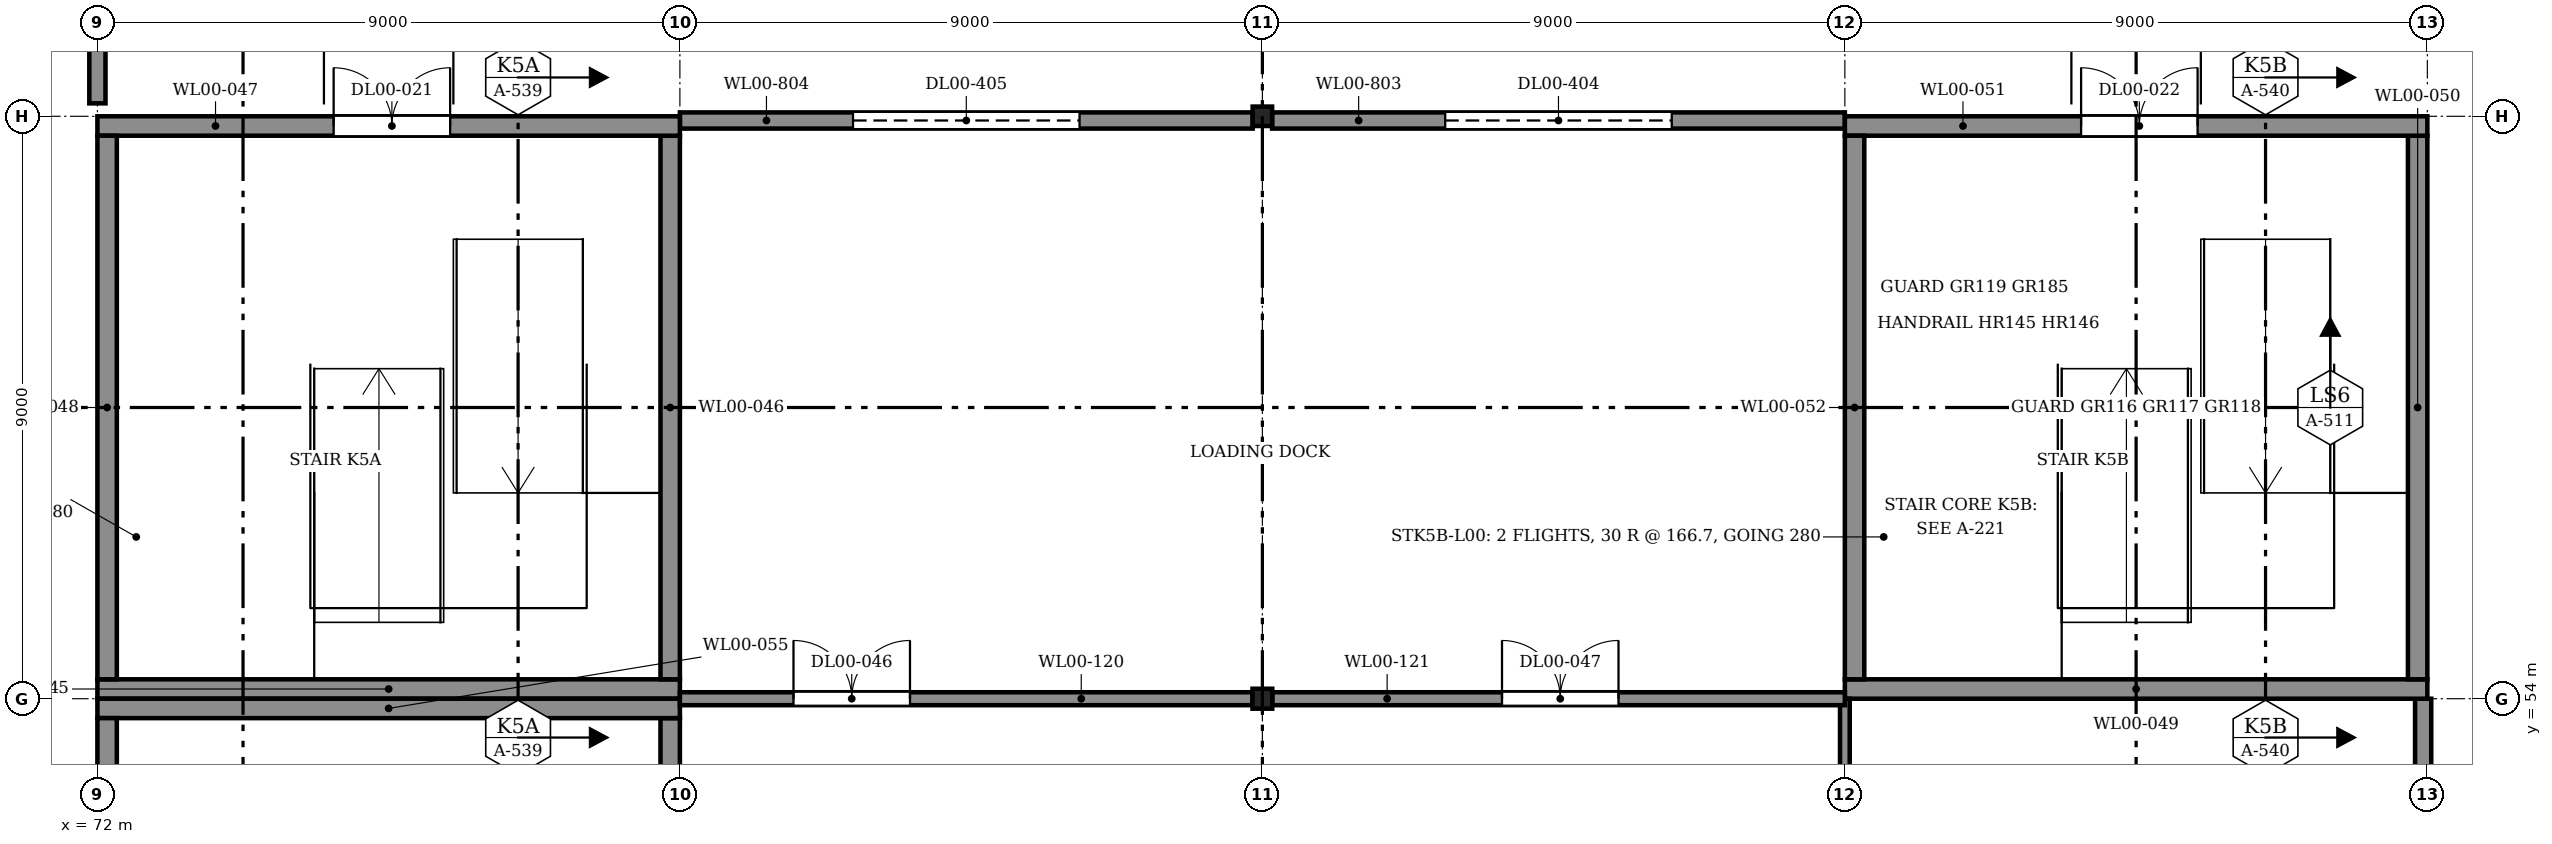
"""IFC4 building model, lengths in metres.
Left out: names, types, materials, properties, quantities, classifications, styles, units other than length and angle.
Written with IfcOpenShell. Run it as: python <this file> out.ifc"""

import sys

from ifc_helpers import new_model, si_unit, direction, frame, frame_2d, origin, origin_2d, place, context, subcontext, project, spatial, polyline, rectangle, hollow_rectangle, i_section, outline, extrude, element, fill, save


model = new_model("IFC4")
c1 = context("Model", 3, precision=1e-05, world=origin(), true_north=direction((0.0, 1.0)))
c2 = subcontext(c1, "Body", "Model", "MODEL_VIEW")
j1 = project(units=[si_unit("LENGTHUNIT", "METRE"), si_unit("PLANEANGLEUNIT", "RADIAN")], contexts=[c1])
p1 = place(None, origin())
s1 = spatial("IfcSite", under=j1, at=p1, CompositionType="ELEMENT")
p2 = place(p1, origin())
s2 = spatial("IfcBuilding", under=s1, at=p2, CompositionType="ELEMENT")
p3 = place(p2, origin())
s3 = spatial("IfcBuildingStorey", under=s2, at=p3, CompositionType="ELEMENT", Elevation=0.0)
p4 = place(p3, frame((90.0, 54.0, 0.0), z_axis=(0.0, 0.0, 1.0), x_axis=(1.0, 0.0, 0.0)))
e1 = element("IfcColumn", 1, at=p4, inside=s3, PredefinedType="COLUMN", context=c2, shape_type="SweptSolid", body=[
    extrude(i_section(OverallWidth=0.305, OverallDepth=0.308, WebThickness=0.01, FlangeThickness=0.015, FilletRadius=0.017, at=origin_2d()), origin(), (0.0, 0.0, 1.0), 5.0),
])
p5 = place(p3, frame((90.0, 63.0, 0.0), z_axis=(0.0, 0.0, 1.0), x_axis=(1.0, 0.0, 0.0)))
e2 = element("IfcColumn", 2, at=p5, inside=s3, PredefinedType="COLUMN", context=c2, shape_type="SweptSolid", body=[
    extrude(hollow_rectangle(XDim=0.3, YDim=0.3, WallThickness=0.01, InnerFilletRadius=0.015, OuterFilletRadius=0.025, at=origin_2d()), origin(), (0.0, 0.0, 1.0), 5.0),
])
p6 = place(p3, frame((107.935, 45.15, 0.0), z_axis=(0.0, 0.0, 1.0), x_axis=(0.0, 1.0, 0.0)))
e3 = element("IfcWall", 3, at=p6, inside=s3, PredefinedType="SOLIDWALL", context=c2, shape_type="SweptSolid", body=[
    extrude(rectangle(XDim=8.85, YDim=0.25, at=frame_2d((4.425, 0.0))), origin(), (0.0, 0.0, 1.0), 4.05),
])
p7 = place(p3, frame((90.15, 62.935, 0.0), z_axis=(0.0, 0.0, 1.0), x_axis=(1.0, 0.0, 0.0)))
e4 = element("IfcWall", 4, at=p7, inside=s3, PredefinedType="SOLIDWALL", context=c2, shape_type="SweptSolid", body=[
    extrude(rectangle(XDim=8.85, YDim=0.25, at=frame_2d((4.425, 0.0))), origin(), (0.0, 0.0, 1.0), 4.05),
])
p8 = place(p7, frame((2.675, 0.0, 0.0)))
e5 = element("IfcOpeningElement", 5, at=p8, cuts=e4, PredefinedType="OPENING", context=c2, shape_type="SweptSolid", body=[
    extrude(rectangle(XDim=3.5, YDim=4.0, at=frame_2d((1.75, 2.0))), frame((0.0, 0.135, 0.0), z_axis=(0.0, -1.0, 0.0), x_axis=(1.0, 0.0, 0.0)), (0.0, 0.0, 1.0), 0.27),
])
p9 = place(p3, frame((81.0, 62.935, 0.0), z_axis=(0.0, 0.0, 1.0), x_axis=(1.0, 0.0, 0.0)))
e6 = element("IfcWall", 6, at=p9, inside=s3, PredefinedType="SOLIDWALL", context=c2, shape_type="SweptSolid", body=[
    extrude(rectangle(XDim=8.85, YDim=0.25, at=frame_2d((4.425, 0.0))), origin(), (0.0, 0.0, 1.0), 4.05),
])
p10 = place(p9, frame((2.675, 0.0, 0.0)))
e7 = element("IfcOpeningElement", 7, at=p10, cuts=e6, PredefinedType="OPENING", context=c2, shape_type="SweptSolid", body=[
    extrude(rectangle(XDim=3.5, YDim=4.0, at=frame_2d((1.75, 2.0))), frame((0.0, 0.135, 0.0), z_axis=(0.0, -1.0, 0.0), x_axis=(1.0, 0.0, 0.0)), (0.0, 0.0, 1.0), 0.27),
])
p11 = place(p3, frame((72.0, 63.2, -1.95), z_axis=(0.0, 0.0, 1.0), x_axis=(0.0, 1.0, 0.0)))
e8 = element("IfcWall", 8, at=p11, inside=s3, PredefinedType="SOLIDWALL", context=c2, shape_type="SweptSolid", body=[
    extrude(outline(polyline([(0.0, 0.0), (5.8, 0.0), (5.8, 0.75), (0.0, 1.04), (0.0, 0.0)])), frame((0.0, 0.125, 0.0), z_axis=(0.0, -1.0, 0.0), x_axis=(1.0, 0.0, 0.0)), (0.0, 0.0, 1.0), 0.25),
])
p12 = place(p3, frame((72.0, 54.15, 0.0), z_axis=(0.0, 0.0, 1.0), x_axis=(1.0, 0.0, 0.0)))
e9 = element("IfcWall", 9, at=p12, inside=s3, PredefinedType="SOLIDWALL", context=c2, shape_type="SweptSolid", body=[
    extrude(rectangle(XDim=9.0, YDim=0.3, at=frame_2d((4.5, 0.0))), origin(), (0.0, 0.0, 1.0), 5.0),
])
p13 = place(p3, frame((80.85, 54.3, 0.0), z_axis=(0.0, 0.0, 1.0), x_axis=(0.0, 1.0, 0.0)))
e10 = element("IfcWall", 10, at=p13, inside=s3, PredefinedType="SOLIDWALL", context=c2, shape_type="SweptSolid", body=[
    extrude(rectangle(XDim=8.4, YDim=0.3, at=frame_2d((4.2, 0.0))), origin(), (0.0, 0.0, 1.0), 5.0),
])
p14 = place(p3, frame((72.0, 62.85, 0.0), z_axis=(0.0, 0.0, 1.0), x_axis=(1.0, 0.0, 0.0)))
e11 = element("IfcWall", 11, at=p14, inside=s3, PredefinedType="SOLIDWALL", context=c2, shape_type="SweptSolid", body=[
    extrude(rectangle(XDim=9.0, YDim=0.3, at=frame_2d((4.5, 0.0))), origin(), (0.0, 0.0, 1.0), 5.0),
])
p15 = place(p14, frame((3.65, 0.0, 0.0)))
e12 = element("IfcOpeningElement", 12, at=p15, cuts=e11, PredefinedType="OPENING", context=c2, shape_type="SweptSolid", body=[
    extrude(rectangle(XDim=1.8, YDim=2.1, at=frame_2d((0.9, 1.05))), frame((0.0, 0.16, 0.0), z_axis=(0.0, -1.0, 0.0), x_axis=(1.0, 0.0, 0.0)), (0.0, 0.0, 1.0), 0.32),
])
p16 = place(p3, frame((72.15, 54.3, 0.0), z_axis=(0.0, 0.0, 1.0), x_axis=(0.0, 1.0, 0.0)))
e13 = element("IfcWall", 13, at=p16, inside=s3, PredefinedType="SOLIDWALL", context=c2, shape_type="SweptSolid", body=[
    extrude(rectangle(XDim=8.4, YDim=0.3, at=frame_2d((4.2, 0.0))), origin(), (0.0, 0.0, 1.0), 5.0),
])
p17 = place(p3, frame((99.0, 54.15, 0.0), z_axis=(0.0, 0.0, 1.0), x_axis=(1.0, 0.0, 0.0)))
e14 = element("IfcWall", 14, at=p17, inside=s3, PredefinedType="SOLIDWALL", context=c2, shape_type="SweptSolid", body=[
    extrude(rectangle(XDim=9.0, YDim=0.3, at=frame_2d((4.5, 0.0))), origin(), (0.0, 0.0, 1.0), 5.0),
])
p18 = place(p3, frame((107.85, 54.3, 0.0), z_axis=(0.0, 0.0, 1.0), x_axis=(0.0, 1.0, 0.0)))
e15 = element("IfcWall", 15, at=p18, inside=s3, PredefinedType="SOLIDWALL", context=c2, shape_type="SweptSolid", body=[
    extrude(rectangle(XDim=8.4, YDim=0.3, at=frame_2d((4.2, 0.0))), origin(), (0.0, 0.0, 1.0), 5.0),
])
p19 = place(p3, frame((99.0, 62.85, 0.0), z_axis=(0.0, 0.0, 1.0), x_axis=(1.0, 0.0, 0.0)))
e16 = element("IfcWall", 16, at=p19, inside=s3, PredefinedType="SOLIDWALL", context=c2, shape_type="SweptSolid", body=[
    extrude(rectangle(XDim=9.0, YDim=0.3, at=frame_2d((4.5, 0.0))), origin(), (0.0, 0.0, 1.0), 5.0),
])
p20 = place(p19, frame((3.65, 0.0, 0.0)))
e17 = element("IfcOpeningElement", 17, at=p20, cuts=e16, PredefinedType="OPENING", context=c2, shape_type="SweptSolid", body=[
    extrude(rectangle(XDim=1.8, YDim=2.1, at=frame_2d((0.9, 1.05))), frame((0.0, 0.16, 0.0), z_axis=(0.0, -1.0, 0.0), x_axis=(1.0, 0.0, 0.0)), (0.0, 0.0, 1.0), 0.32),
])
p21 = place(p3, frame((99.15, 54.3, 0.0), z_axis=(0.0, 0.0, 1.0), x_axis=(0.0, 1.0, 0.0)))
e18 = element("IfcWall", 18, at=p21, inside=s3, PredefinedType="SOLIDWALL", context=c2, shape_type="SweptSolid", body=[
    extrude(rectangle(XDim=8.4, YDim=0.3, at=frame_2d((4.2, 0.0))), origin(), (0.0, 0.0, 1.0), 5.0),
])
p22 = place(p3, frame((80.85, 45.3, 0.0), z_axis=(0.0, 0.0, 1.0), x_axis=(0.0, 1.0, 0.0)))
e19 = element("IfcWall", 19, at=p22, inside=s3, PredefinedType="SOLIDWALL", context=c2, shape_type="SweptSolid", body=[
    extrude(rectangle(XDim=8.4, YDim=0.3, at=frame_2d((4.2, 0.0))), origin(), (0.0, 0.0, 1.0), 5.0),
])
p23 = place(p22, frame((3.0, 0.0, 0.0)))
e20 = element("IfcOpeningElement", 20, at=p23, cuts=e19, PredefinedType="OPENING", context=c2, shape_type="SweptSolid", body=[
    extrude(rectangle(XDim=2.4, YDim=2.4, at=frame_2d((1.2, 1.2))), frame((0.0, 0.16, 0.0), z_axis=(0.0, -1.0, 0.0), x_axis=(1.0, 0.0, 0.0)), (0.0, 0.0, 1.0), 0.32),
])
p24 = place(p3, frame((72.0, 53.85, 0.0), z_axis=(0.0, 0.0, 1.0), x_axis=(1.0, 0.0, 0.0)))
e21 = element("IfcWall", 21, at=p24, inside=s3, PredefinedType="SOLIDWALL", context=c2, shape_type="SweptSolid", body=[
    extrude(rectangle(XDim=9.0, YDim=0.3, at=frame_2d((4.5, 0.0))), origin(), (0.0, 0.0, 1.0), 5.0),
])
p25 = place(p3, frame((72.15, 45.3, 0.0), z_axis=(0.0, 0.0, 1.0), x_axis=(0.0, 1.0, 0.0)))
e22 = element("IfcWall", 22, at=p25, inside=s3, PredefinedType="SOLIDWALL", context=c2, shape_type="SweptSolid", body=[
    extrude(rectangle(XDim=8.4, YDim=0.3, at=frame_2d((4.2, 0.0))), origin(), (0.0, 0.0, 1.0), 5.0),
])
p26 = place(p3, frame((99.0, 45.16, 0.0), z_axis=(0.0, 0.0, 1.0), x_axis=(0.0, 1.0, 0.0)))
e23 = element("IfcWall", 23, at=p26, inside=s3, PredefinedType="PARTITIONING", context=c2, shape_type="SweptSolid", body=[
    extrude(rectangle(XDim=8.84, YDim=0.15, at=frame_2d((4.42, 0.0))), origin(), (0.0, 0.0, 1.0), 3.958),
])
p27 = place(p26, frame((3.95, 0.0, 0.0)))
e24 = element("IfcOpeningElement", 24, at=p27, cuts=e23, PredefinedType="OPENING", context=c2, shape_type="SweptSolid", body=[
    extrude(rectangle(XDim=1.0, YDim=2.1, at=frame_2d((0.5, 1.05))), frame((0.0, 0.085, 0.0), z_axis=(0.0, -1.0, 0.0), x_axis=(1.0, 0.0, 0.0)), (0.0, 0.0, 1.0), 0.17),
])
p28 = place(p3, frame((81.0, 54.0, 0.0), z_axis=(0.0, 0.0, 1.0), x_axis=(1.0, 0.0, 0.0)))
e25 = element("IfcWall", 25, at=p28, inside=s3, PredefinedType="PARTITIONING", context=c2, shape_type="SweptSolid", body=[
    extrude(rectangle(XDim=8.847, YDim=0.2, at=frame_2d((4.424, 0.0))), origin(), (0.0, 0.0, 1.0), 3.958),
])
p29 = place(p28, frame((1.755, 0.0, 0.0)))
e26 = element("IfcOpeningElement", 26, at=p29, cuts=e25, PredefinedType="OPENING", context=c2, shape_type="SweptSolid", body=[
    extrude(rectangle(XDim=1.8, YDim=2.1, at=frame_2d((0.9, 1.05))), frame((0.0, 0.11, 0.0), z_axis=(0.0, -1.0, 0.0), x_axis=(1.0, 0.0, 0.0)), (0.0, 0.0, 1.0), 0.22),
])
p30 = place(p3, frame((90.153, 54.0, 0.0), z_axis=(0.0, 0.0, 1.0), x_axis=(1.0, 0.0, 0.0)))
e27 = element("IfcWall", 27, at=p30, inside=s3, PredefinedType="PARTITIONING", context=c2, shape_type="SweptSolid", body=[
    extrude(rectangle(XDim=8.847, YDim=0.2, at=frame_2d((4.424, 0.0))), origin(), (0.0, 0.0, 1.0), 3.958),
])
p31 = place(p30, frame((3.55, 0.0, 0.0)))
e28 = element("IfcOpeningElement", 28, at=p31, cuts=e27, PredefinedType="OPENING", context=c2, shape_type="SweptSolid", body=[
    extrude(rectangle(XDim=1.8, YDim=2.1, at=frame_2d((0.9, 1.05))), frame((0.0, 0.11, 0.0), z_axis=(0.0, -1.0, 0.0), x_axis=(1.0, 0.0, 0.0)), (0.0, 0.0, 1.0), 0.22),
])
p32 = place(p8, origin())
e29 = element("IfcDoor", 29, at=p32, inside=s3, OperationType="ROLLINGUP", PredefinedType="DOOR", context=c2, shape_type="SweptSolid", body=[
    extrude(rectangle(XDim=3.5, YDim=4.0, at=frame_2d((1.75, 2.0))), frame((0.0, 0.025, 0.0), z_axis=(0.0, -1.0, 0.0), x_axis=(1.0, 0.0, 0.0)), (0.0, 0.0, 1.0), 0.05),
])
fill(e5, e29)
p33 = place(p10, origin())
e30 = element("IfcDoor", 30, at=p33, inside=s3, OperationType="ROLLINGUP", PredefinedType="DOOR", context=c2, shape_type="SweptSolid", body=[
    extrude(rectangle(XDim=3.5, YDim=4.0, at=frame_2d((1.75, 2.0))), frame((0.0, 0.025, 0.0), z_axis=(0.0, -1.0, 0.0), x_axis=(1.0, 0.0, 0.0)), (0.0, 0.0, 1.0), 0.05),
])
fill(e7, e30)
p34 = place(p15, origin())
e31 = element("IfcDoor", 31, at=p34, inside=s3, OperationType="DOUBLE_DOOR_SINGLE_SWING", PredefinedType="DOOR", context=c2, shape_type="SweptSolid", body=[
    extrude(rectangle(XDim=1.8, YDim=2.1, at=frame_2d((0.9, 1.05))), frame((0.0, 0.025, 0.0), z_axis=(0.0, -1.0, 0.0), x_axis=(1.0, 0.0, 0.0)), (0.0, 0.0, 1.0), 0.05),
])
fill(e12, e31)
p35 = place(p20, origin())
e32 = element("IfcDoor", 32, at=p35, inside=s3, OperationType="DOUBLE_DOOR_SINGLE_SWING", PredefinedType="DOOR", context=c2, shape_type="SweptSolid", body=[
    extrude(rectangle(XDim=1.8, YDim=2.1, at=frame_2d((0.9, 1.05))), frame((0.0, 0.025, 0.0), z_axis=(0.0, -1.0, 0.0), x_axis=(1.0, 0.0, 0.0)), (0.0, 0.0, 1.0), 0.05),
])
fill(e17, e32)
p36 = place(p29, origin())
e33 = element("IfcDoor", 33, at=p36, inside=s3, OperationType="DOUBLE_DOOR_SINGLE_SWING", PredefinedType="DOOR", context=c2, shape_type="SweptSolid", body=[
    extrude(rectangle(XDim=1.8, YDim=2.1, at=frame_2d((0.9, 1.05))), frame((0.0, 0.025, 0.0), z_axis=(0.0, -1.0, 0.0), x_axis=(1.0, 0.0, 0.0)), (0.0, 0.0, 1.0), 0.05),
])
fill(e26, e33)
p37 = place(p31, origin())
e34 = element("IfcDoor", 34, at=p37, inside=s3, OperationType="DOUBLE_DOOR_SINGLE_SWING", PredefinedType="DOOR", context=c2, shape_type="SweptSolid", body=[
    extrude(rectangle(XDim=1.8, YDim=2.1, at=frame_2d((0.9, 1.05))), frame((0.0, 0.025, 0.0), z_axis=(0.0, -1.0, 0.0), x_axis=(1.0, 0.0, 0.0)), (0.0, 0.0, 1.0), 0.05),
])
fill(e28, e34)
save(model, sys.argv[1])
